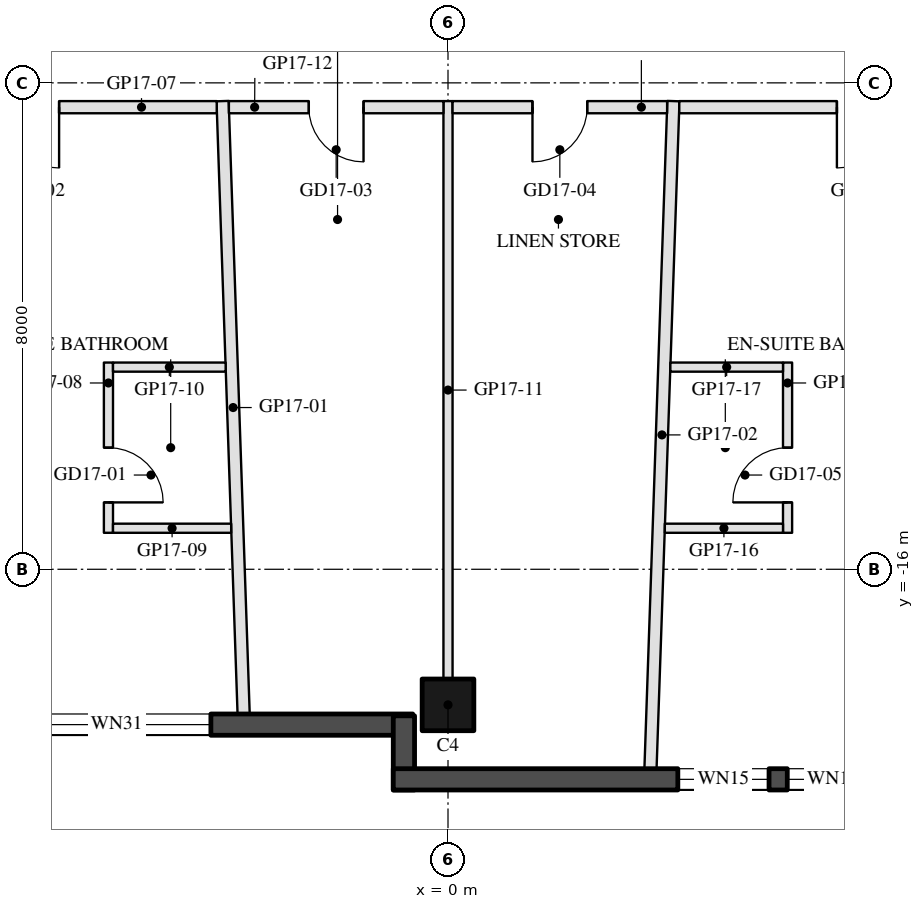
"""IFC4 building model, lengths in metres.
Left out: names, types, materials, properties, quantities, classifications, styles, units other than length and angle.
Written with IfcOpenShell. Run it as: python <this file> out.ifc"""

import sys

from ifc_helpers import new_model, si_unit, direction, frame, frame_2d, origin, origin_2d, place, context, subcontext, project, spatial, rectangle, hollow_rectangle, extrude, element, fill, save


model = new_model("IFC4")
c1 = context("Model", 3, precision=1e-05, world=origin(), true_north=direction((0.0, 1.0)))
c2 = subcontext(c1, "Body", "Model", "MODEL_VIEW")
j1 = project(units=[si_unit("LENGTHUNIT", "METRE"), si_unit("PLANEANGLEUNIT", "RADIAN")], contexts=[c1])
p1 = place(None, origin())
s1 = spatial("IfcSite", under=j1, at=p1, CompositionType="ELEMENT")
p2 = place(p1, origin())
s2 = spatial("IfcBuilding", under=s1, at=p2, CompositionType="ELEMENT")
p3 = place(p2, frame((0.0, 0.0, 183.6)))
s3 = spatial("IfcBuildingStorey", under=s2, at=p3, CompositionType="ELEMENT", Elevation=183.6)
p4 = place(p3, frame((0.0, -18.23, 0.0), z_axis=(0.0, 0.0, 1.0), x_axis=(-1.0, 0.0, 0.0)))
e1 = element("IfcColumn", 1, at=p4, inside=s3, PredefinedType="COLUMN", context=c2, shape_type="SweptSolid", body=[
    extrude(hollow_rectangle(XDim=0.85, YDim=0.85, WallThickness=0.04, at=origin_2d()), origin(), (0.0, 0.0, 1.0), 3.7),
])
p5 = place(p3, frame((-7.32, -18.555, 0.0), z_axis=(0.0, 0.0, 1.0), x_axis=(1.0, 0.0, 0.0)))
e2 = element("IfcWall", 2, at=p5, inside=s3, PredefinedType="SOLIDWALL", context=c2, shape_type="SweptSolid", body=[
    extrude(rectangle(XDim=6.74, YDim=0.35, at=frame_2d((3.37, 0.0))), origin(), (0.0, 0.0, 1.0), 3.55),
])
p6 = place(p5, frame((0.32, 0.0, 0.3)))
e3 = element("IfcOpeningElement", 3, at=p6, cuts=e2, PredefinedType="OPENING", context=c2, shape_type="SweptSolid", body=[
    extrude(rectangle(XDim=3.1, YDim=2.65, at=frame_2d((1.55, 1.325))), frame((0.0, 0.185, 0.0), z_axis=(0.0, -1.0, 0.0), x_axis=(1.0, 0.0, 0.0)), (0.0, 0.0, 1.0), 0.37),
])
p7 = place(p3, frame((-0.725, -18.41, 0.0), z_axis=(0.0, 0.0, 1.0), x_axis=(0.0, -1.0, 0.0)))
e4 = element("IfcWall", 4, at=p7, inside=s3, PredefinedType="SOLIDWALL", context=c2, shape_type="SweptSolid", body=[
    extrude(rectangle(XDim=1.22, YDim=0.35, at=frame_2d((0.61, 0.0))), origin(), (0.0, 0.0, 1.0), 3.55),
])
p8 = place(p3, frame((-0.9, -19.455, 0.0), z_axis=(0.0, 0.0, 1.0), x_axis=(1.0, 0.0, 0.0)))
e5 = element("IfcWall", 5, at=p8, inside=s3, PredefinedType="SOLIDWALL", context=c2, shape_type="SweptSolid", body=[
    extrude(rectangle(XDim=9.7, YDim=0.35, at=frame_2d((4.85, 0.0))), origin(), (0.0, 0.0, 1.0), 3.55),
])
p9 = place(p8, frame((4.68, 0.0, 0.3)))
e6 = element("IfcOpeningElement", 6, at=p9, cuts=e5, PredefinedType="OPENING", context=c2, shape_type="SweptSolid", body=[
    extrude(rectangle(XDim=1.5, YDim=2.65, at=frame_2d((0.75, 1.325))), frame((0.0, 0.185, 0.0), z_axis=(0.0, -1.0, 0.0), x_axis=(1.0, 0.0, 0.0)), (0.0, 0.0, 1.0), 0.37),
])
p10 = place(p8, frame((6.48, 0.0, 0.3)))
e7 = element("IfcOpeningElement", 7, at=p10, cuts=e5, PredefinedType="OPENING", context=c2, shape_type="SweptSolid", body=[
    extrude(rectangle(XDim=1.5, YDim=2.65, at=frame_2d((0.75, 1.325))), frame((0.0, 0.185, 0.0), z_axis=(0.0, -1.0, 0.0), x_axis=(1.0, 0.0, 0.0)), (0.0, 0.0, 1.0), 0.37),
])
p11 = place(p3, frame((-3.361, -18.38, 0.0), z_axis=(0.0, 0.0, 1.0), x_axis=(-0.034300534927, 0.999411563523, 0.0)))
e8 = element("IfcWall", 8, at=p11, inside=s3, PredefinedType="PARTITIONING", context=c2, shape_type="SweptSolid", body=[
    extrude(rectangle(XDim=10.086, YDim=0.2, at=frame_2d((5.043, 0.0))), origin(), (0.0, 0.0, 1.0), 3.06),
])
p12 = place(p3, frame((3.33, -19.28, 0.0), z_axis=(0.0, 0.0, 1.0), x_axis=(0.034288537327, 0.999411975217, 0.0)))
e9 = element("IfcWall", 9, at=p12, inside=s3, PredefinedType="PARTITIONING", context=c2, shape_type="SweptSolid", body=[
    extrude(rectangle(XDim=10.986, YDim=0.2, at=frame_2d((5.493, 0.0))), origin(), (0.0, 0.0, 1.0), 3.06),
])
p13 = place(p3, frame((-3.803, -8.4, 0.0), z_axis=(0.0, 0.0, 1.0), x_axis=(-1.0, 0.0, 0.0)))
e10 = element("IfcWall", 10, at=p13, inside=s3, PredefinedType="PARTITIONING", context=c2, shape_type="SweptSolid", body=[
    extrude(rectangle(XDim=6.185, YDim=0.2, at=frame_2d((3.092, 0.0))), origin(), (0.0, 0.0, 1.0), 2.95),
])
p14 = place(p13, frame((2.592, 0.0, 0.0)))
e11 = element("IfcOpeningElement", 11, at=p14, cuts=e10, PredefinedType="OPENING", context=c2, shape_type="SweptSolid", body=[
    extrude(rectangle(XDim=1.0, YDim=2.1, at=frame_2d((0.5, 1.05))), frame((0.0, 0.11, 0.0), z_axis=(0.0, -1.0, 0.0), x_axis=(1.0, 0.0, 0.0)), (0.0, 0.0, 1.0), 0.22),
])
p15 = place(p3, frame((-5.584, -12.6, 0.0), z_axis=(0.0, 0.0, 1.0), x_axis=(0.0, -1.0, 0.0)))
e12 = element("IfcWall", 12, at=p15, inside=s3, PredefinedType="PARTITIONING", context=c2, shape_type="SweptSolid", body=[
    extrude(rectangle(XDim=2.8, YDim=0.15, at=frame_2d((1.4, 0.0))), origin(), (0.0, 0.0, 1.0), 3.55),
])
p16 = place(p15, frame((1.4, 0.0, 0.0)))
e13 = element("IfcOpeningElement", 13, at=p16, cuts=e12, PredefinedType="OPENING", context=c2, shape_type="SweptSolid", body=[
    extrude(rectangle(XDim=0.9, YDim=2.1, at=frame_2d((0.45, 1.05))), frame((0.0, 0.085, 0.0), z_axis=(0.0, -1.0, 0.0), x_axis=(1.0, 0.0, 0.0)), (0.0, 0.0, 1.0), 0.17),
])
p17 = place(p3, frame((-5.509, -15.325, 0.0), z_axis=(0.0, 0.0, 1.0), x_axis=(1.0, 0.0, 0.0)))
e14 = element("IfcWall", 14, at=p17, inside=s3, PredefinedType="PARTITIONING", context=c2, shape_type="SweptSolid", body=[
    extrude(rectangle(XDim=1.943, YDim=0.15, at=frame_2d((0.972, 0.0))), origin(), (0.0, 0.0, 1.0), 2.95),
])
p18 = place(p3, frame((-5.509, -12.675, 0.0), z_axis=(0.0, 0.0, 1.0), x_axis=(1.0, 0.0, 0.0)))
e15 = element("IfcWall", 15, at=p18, inside=s3, PredefinedType="PARTITIONING", context=c2, shape_type="SweptSolid", body=[
    extrude(rectangle(XDim=1.853, YDim=0.15, at=frame_2d((0.926, 0.0))), origin(), (0.0, 0.0, 1.0), 2.95),
])
p19 = place(p3, frame((0.0, -17.805, 0.0), z_axis=(0.0, 0.0, 1.0), x_axis=(0.0, 1.0, 0.0)))
e16 = element("IfcWall", 16, at=p19, inside=s3, PredefinedType="PARTITIONING", context=c2, shape_type="SweptSolid", body=[
    extrude(rectangle(XDim=9.505, YDim=0.15, at=frame_2d((4.752, 0.0))), origin(), (0.0, 0.0, 1.0), 2.95),
])
p20 = place(p3, frame((-0.075, -8.4, 0.0), z_axis=(0.0, 0.0, 1.0), x_axis=(-1.0, 0.0, 0.0)))
e17 = element("IfcWall", 17, at=p20, inside=s3, PredefinedType="PARTITIONING", context=c2, shape_type="SweptSolid", body=[
    extrude(rectangle(XDim=3.529, YDim=0.2, at=frame_2d((1.764, 0.0))), origin(), (0.0, 0.0, 1.0), 2.95),
])
p21 = place(p20, frame((1.314, 0.0, 0.0)))
e18 = element("IfcOpeningElement", 18, at=p21, cuts=e17, PredefinedType="OPENING", context=c2, shape_type="SweptSolid", body=[
    extrude(rectangle(XDim=0.9, YDim=2.1, at=frame_2d((0.45, 1.05))), frame((0.0, 0.11, 0.0), z_axis=(0.0, -1.0, 0.0), x_axis=(1.0, 0.0, 0.0)), (0.0, 0.0, 1.0), 0.22),
])
p22 = place(p3, frame((3.604, -8.4, 0.0), z_axis=(0.0, 0.0, 1.0), x_axis=(-1.0, 0.0, 0.0)))
e19 = element("IfcWall", 19, at=p22, inside=s3, PredefinedType="PARTITIONING", context=c2, shape_type="SweptSolid", body=[
    extrude(rectangle(XDim=3.529, YDim=0.2, at=frame_2d((1.764, 0.0))), origin(), (0.0, 0.0, 1.0), 2.95),
])
p23 = place(p22, frame((1.314, 0.0, 0.0)))
e20 = element("IfcOpeningElement", 20, at=p23, cuts=e19, PredefinedType="OPENING", context=c2, shape_type="SweptSolid", body=[
    extrude(rectangle(XDim=0.9, YDim=2.1, at=frame_2d((0.45, 1.05))), frame((0.0, 0.11, 0.0), z_axis=(0.0, -1.0, 0.0), x_axis=(1.0, 0.0, 0.0)), (0.0, 0.0, 1.0), 0.22),
])
p24 = place(p3, frame((9.988, -8.4, 0.0), z_axis=(0.0, 0.0, 1.0), x_axis=(-1.0, 0.0, 0.0)))
e21 = element("IfcWall", 21, at=p24, inside=s3, PredefinedType="PARTITIONING", context=c2, shape_type="SweptSolid", body=[
    extrude(rectangle(XDim=6.185, YDim=0.2, at=frame_2d((3.092, 0.0))), origin(), (0.0, 0.0, 1.0), 2.95),
])
p25 = place(p24, frame((2.592, 0.0, 0.0)))
e22 = element("IfcOpeningElement", 22, at=p25, cuts=e21, PredefinedType="OPENING", context=c2, shape_type="SweptSolid", body=[
    extrude(rectangle(XDim=1.0, YDim=2.1, at=frame_2d((0.5, 1.05))), frame((0.0, 0.11, 0.0), z_axis=(0.0, -1.0, 0.0), x_axis=(1.0, 0.0, 0.0)), (0.0, 0.0, 1.0), 0.22),
])
p26 = place(p3, frame((5.584, -15.4, 0.0), z_axis=(0.0, 0.0, 1.0), x_axis=(0.0, 1.0, 0.0)))
e23 = element("IfcWall", 23, at=p26, inside=s3, PredefinedType="PARTITIONING", context=c2, shape_type="SweptSolid", body=[
    extrude(rectangle(XDim=2.8, YDim=0.15, at=frame_2d((1.4, 0.0))), origin(), (0.0, 0.0, 1.0), 3.55),
])
p27 = place(p26, frame((0.5, 0.0, 0.0)))
e24 = element("IfcOpeningElement", 24, at=p27, cuts=e23, PredefinedType="OPENING", context=c2, shape_type="SweptSolid", body=[
    extrude(rectangle(XDim=0.9, YDim=2.1, at=frame_2d((0.45, 1.05))), frame((0.0, 0.085, 0.0), z_axis=(0.0, -1.0, 0.0), x_axis=(1.0, 0.0, 0.0)), (0.0, 0.0, 1.0), 0.17),
])
p28 = place(p3, frame((3.566, -15.325, 0.0), z_axis=(0.0, 0.0, 1.0), x_axis=(1.0, 0.0, 0.0)))
e25 = element("IfcWall", 25, at=p28, inside=s3, PredefinedType="PARTITIONING", context=c2, shape_type="SweptSolid", body=[
    extrude(rectangle(XDim=1.943, YDim=0.15, at=frame_2d((0.972, 0.0))), origin(), (0.0, 0.0, 1.0), 2.95),
])
p29 = place(p3, frame((3.657, -12.675, 0.0), z_axis=(0.0, 0.0, 1.0), x_axis=(1.0, 0.0, 0.0)))
e26 = element("IfcWall", 26, at=p29, inside=s3, PredefinedType="PARTITIONING", context=c2, shape_type="SweptSolid", body=[
    extrude(rectangle(XDim=1.853, YDim=0.15, at=frame_2d((0.926, 0.0))), origin(), (0.0, 0.0, 1.0), 2.95),
])
p30 = place(p6, origin())
e27 = element("IfcWindow", 27, at=p30, inside=s3, PartitioningType="SINGLE_PANEL", PredefinedType="WINDOW", context=c2, shape_type="SweptSolid", body=[
    extrude(rectangle(XDim=3.1, YDim=2.65, at=frame_2d((1.55, 1.325))), frame((0.0, 0.03, 0.0), z_axis=(0.0, -1.0, 0.0), x_axis=(1.0, 0.0, 0.0)), (0.0, 0.0, 1.0), 0.06),
])
fill(e3, e27)
p31 = place(p9, origin())
e28 = element("IfcWindow", 28, at=p31, inside=s3, PartitioningType="SINGLE_PANEL", PredefinedType="WINDOW", context=c2, shape_type="SweptSolid", body=[
    extrude(rectangle(XDim=1.5, YDim=2.65, at=frame_2d((0.75, 1.325))), frame((0.0, 0.03, 0.0), z_axis=(0.0, -1.0, 0.0), x_axis=(1.0, 0.0, 0.0)), (0.0, 0.0, 1.0), 0.06),
])
fill(e6, e28)
p32 = place(p10, origin())
e29 = element("IfcWindow", 29, at=p32, inside=s3, PartitioningType="SINGLE_PANEL", PredefinedType="WINDOW", context=c2, shape_type="SweptSolid", body=[
    extrude(rectangle(XDim=1.5, YDim=2.65, at=frame_2d((0.75, 1.325))), frame((0.0, 0.03, 0.0), z_axis=(0.0, -1.0, 0.0), x_axis=(1.0, 0.0, 0.0)), (0.0, 0.0, 1.0), 0.06),
])
fill(e7, e29)
p33 = place(p16, origin())
e30 = element("IfcDoor", 30, at=p33, inside=s3, OperationType="SINGLE_SWING_RIGHT", PredefinedType="DOOR", context=c2, shape_type="SweptSolid", body=[
    extrude(rectangle(XDim=0.9, YDim=2.1, at=frame_2d((0.45, 1.05))), frame((0.0, 0.025, 0.0), z_axis=(0.0, -1.0, 0.0), x_axis=(1.0, 0.0, 0.0)), (0.0, 0.0, 1.0), 0.05),
])
fill(e13, e30)
p34 = place(p14, origin())
e31 = element("IfcDoor", 31, at=p34, inside=s3, OperationType="SINGLE_SWING_LEFT", PredefinedType="DOOR", context=c2, shape_type="SweptSolid", body=[
    extrude(rectangle(XDim=1.0, YDim=2.1, at=frame_2d((0.5, 1.05))), frame((0.0, 0.025, 0.0), z_axis=(0.0, -1.0, 0.0), x_axis=(1.0, 0.0, 0.0)), (0.0, 0.0, 1.0), 0.05),
])
fill(e11, e31)
p35 = place(p21, origin())
e32 = element("IfcDoor", 32, at=p35, inside=s3, OperationType="SINGLE_SWING_LEFT", PredefinedType="DOOR", context=c2, shape_type="SweptSolid", body=[
    extrude(rectangle(XDim=0.9, YDim=2.1, at=frame_2d((0.45, 1.05))), frame((0.0, 0.025, 0.0), z_axis=(0.0, -1.0, 0.0), x_axis=(1.0, 0.0, 0.0)), (0.0, 0.0, 1.0), 0.05),
])
fill(e18, e32)
p36 = place(p23, origin())
e33 = element("IfcDoor", 33, at=p36, inside=s3, OperationType="SINGLE_SWING_RIGHT", PredefinedType="DOOR", context=c2, shape_type="SweptSolid", body=[
    extrude(rectangle(XDim=0.9, YDim=2.1, at=frame_2d((0.45, 1.05))), frame((0.0, 0.025, 0.0), z_axis=(0.0, -1.0, 0.0), x_axis=(1.0, 0.0, 0.0)), (0.0, 0.0, 1.0), 0.05),
])
fill(e20, e33)
p37 = place(p27, origin())
e34 = element("IfcDoor", 34, at=p37, inside=s3, OperationType="SINGLE_SWING_LEFT", PredefinedType="DOOR", context=c2, shape_type="SweptSolid", body=[
    extrude(rectangle(XDim=0.9, YDim=2.1, at=frame_2d((0.45, 1.05))), frame((0.0, 0.025, 0.0), z_axis=(0.0, -1.0, 0.0), x_axis=(1.0, 0.0, 0.0)), (0.0, 0.0, 1.0), 0.05),
])
fill(e24, e34)
p38 = place(p25, origin())
e35 = element("IfcDoor", 35, at=p38, inside=s3, OperationType="SINGLE_SWING_RIGHT", PredefinedType="DOOR", context=c2, shape_type="SweptSolid", body=[
    extrude(rectangle(XDim=1.0, YDim=2.1, at=frame_2d((0.5, 1.05))), frame((0.0, 0.025, 0.0), z_axis=(0.0, -1.0, 0.0), x_axis=(1.0, 0.0, 0.0)), (0.0, 0.0, 1.0), 0.05),
])
fill(e22, e35)
save(model, sys.argv[1])
